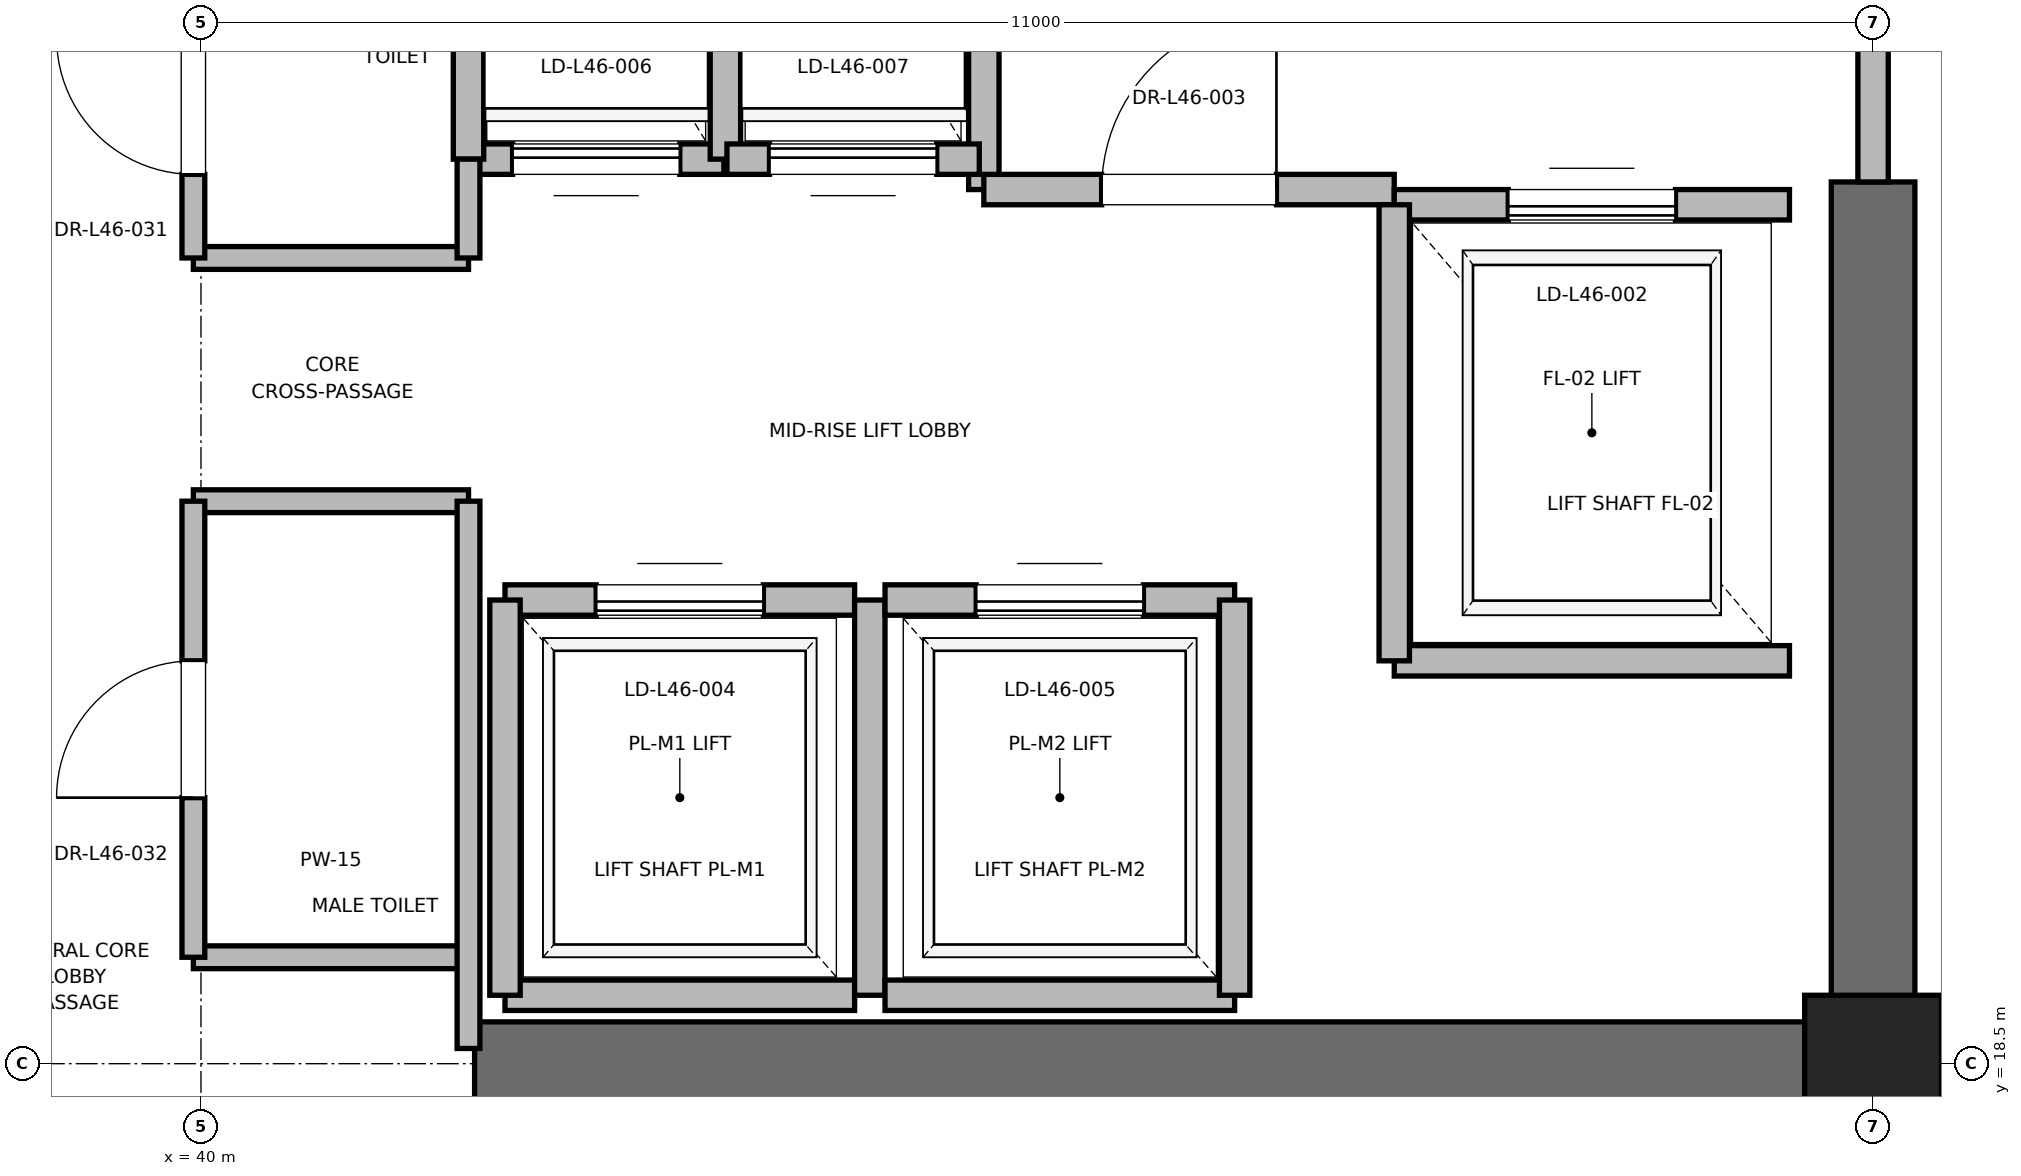
"""IFC4 building model, lengths in metres.
Left out: names, types, materials, properties, quantities, classifications, styles, units other than length and angle.
Written with IfcOpenShell. Run it as: python <this file> out.ifc"""

import sys

from ifc_helpers import new_model, si_unit, direction, frame, frame_2d, origin, origin_2d, place, context, subcontext, project, spatial, rectangle, extrude, element, fill, save


model = new_model("IFC4")
c1 = context("Model", 3, precision=1e-05, world=origin(), true_north=direction((0.0, 1.0)))
c2 = subcontext(c1, "Body", "Model", "MODEL_VIEW")
j1 = project(units=[si_unit("LENGTHUNIT", "METRE"), si_unit("PLANEANGLEUNIT", "RADIAN")], contexts=[c1])
p1 = place(None, origin())
s1 = spatial("IfcSite", under=j1, at=p1, CompositionType="ELEMENT")
p2 = place(p1, origin())
s2 = spatial("IfcBuilding", under=s1, at=p2, CompositionType="ELEMENT")
p3 = place(p2, frame((0.0, 0.0, 200.2)))
s3 = spatial("IfcBuildingStorey", under=s2, at=p3, CompositionType="ELEMENT", Elevation=200.2)
p4 = place(p3, frame((51.0, 18.5, 0.0), z_axis=(0.0, 0.0, 1.0), x_axis=(1.0, 0.0, 0.0)))
e1 = element("IfcColumn", 1, at=p4, inside=s3, PredefinedType="PILASTER", context=c2, shape_type="SweptSolid", body=[
    extrude(rectangle(XDim=0.9, YDim=0.9, at=origin_2d()), origin(), (0.0, 0.0, 1.0), 5.0),
])
p5 = place(p3, frame((41.8, 18.5, 0.0), z_axis=(0.0, 0.0, 1.0), x_axis=(1.0, 0.0, 0.0)))
e2 = element("IfcWall", 2, at=p5, inside=s3, PredefinedType="SHEAR", context=c2, shape_type="SweptSolid", body=[
    extrude(rectangle(XDim=9.2, YDim=0.55, at=frame_2d((4.6, 0.0))), origin(), (0.0, 0.0, 1.0), 4.775),
])
p6 = place(p3, frame((51.0, 18.5, 0.0), z_axis=(0.0, 0.0, 1.0), x_axis=(0.0, 1.0, 0.0)))
e3 = element("IfcWall", 3, at=p6, inside=s3, PredefinedType="SHEAR", context=c2, shape_type="SweptSolid", body=[
    extrude(rectangle(XDim=5.8, YDim=0.55, at=frame_2d((2.9, 0.0))), origin(), (0.0, 0.0, 1.0), 4.775),
])
p7 = place(p3, frame((45.15, 24.25, 0.0), z_axis=(0.0, 0.0, 1.0), x_axis=(0.0, 1.0, 0.0)))
e4 = element("IfcWall", 4, at=p7, inside=s3, PredefinedType="PARTITIONING", context=c2, shape_type="SweptSolid", body=[
    extrude(rectangle(XDim=3.37, YDim=0.2, at=frame_2d((1.685, 0.0))), origin(), (0.0, 0.0, 1.0), 4.775),
])
p8 = place(p3, frame((45.15, 24.25, 0.0), z_axis=(0.0, 0.0, 1.0), x_axis=(1.0, 0.0, 0.0)))
e5 = element("IfcWall", 5, at=p8, inside=s3, PredefinedType="PARTITIONING", context=c2, shape_type="SweptSolid", body=[
    extrude(rectangle(XDim=2.7, YDim=0.2, at=frame_2d((1.35, 0.0))), origin(), (0.0, 0.0, 1.0), 4.775),
])
p9 = place(p8, frame((0.775, 0.0, 0.0)))
e6 = element("IfcOpeningElement", 6, at=p9, cuts=e5, PredefinedType="OPENING", context=c2, shape_type="SweptSolid", body=[
    extrude(rectangle(XDim=1.15, YDim=2.2, at=frame_2d((0.575, 1.1))), frame((0.0, 0.1, 0.0), z_axis=(0.0, -1.0, 0.0), x_axis=(1.0, 0.0, 0.0)), (0.0, 0.0, 1.0), 0.2),
])
p10 = place(p3, frame((51.0, 24.3, 0.0), z_axis=(0.0, 0.0, 1.0), x_axis=(0.0, 1.0, 0.0)))
e7 = element("IfcWall", 7, at=p10, inside=s3, PredefinedType="PARTITIONING", context=c2, shape_type="SweptSolid", body=[
    extrude(rectangle(XDim=3.4, YDim=0.2, at=frame_2d((1.7, 0.0))), origin(), (0.0, 0.0, 1.0), 3.755),
])
p11 = place(p10, frame((1.125, 0.0, 0.0)))
e8 = element("IfcOpeningElement", 8, at=p11, cuts=e7, PredefinedType="OPENING", context=c2, shape_type="SweptSolid", body=[
    extrude(rectangle(XDim=1.15, YDim=2.2, at=frame_2d((0.575, 1.1))), frame((0.0, 0.1, 0.0), z_axis=(0.0, -1.0, 0.0), x_axis=(1.0, 0.0, 0.0)), (0.0, 0.0, 1.0), 0.2),
])
p12 = place(p3, frame((47.85, 21.15, 0.0), z_axis=(0.0, 0.0, 1.0), x_axis=(1.0, 0.0, 0.0)))
e9 = element("IfcWall", 9, at=p12, inside=s3, PredefinedType="SOLIDWALL", context=c2, shape_type="SweptSolid", body=[
    extrude(rectangle(XDim=2.6, YDim=0.2, at=frame_2d((1.3, 0.0))), origin(), (0.0, 0.0, 1.0), 4.775),
])
p13 = place(p3, frame((50.45, 24.15, 0.0), z_axis=(0.0, 0.0, 1.0), x_axis=(-1.0, 0.0, 0.0)))
e10 = element("IfcWall", 10, at=p13, inside=s3, PredefinedType="SOLIDWALL", context=c2, shape_type="SweptSolid", body=[
    extrude(rectangle(XDim=2.6, YDim=0.2, at=frame_2d((1.3, 0.0))), origin(), (0.0, 0.0, 1.0), 3.755),
])
p14 = place(p13, frame((0.75, 0.0, 0.0)))
e11 = element("IfcOpeningElement", 11, at=p14, cuts=e10, PredefinedType="OPENING", context=c2, shape_type="SweptSolid", body=[
    extrude(rectangle(XDim=1.1, YDim=2.2, at=frame_2d((0.55, 1.1))), frame((0.0, 0.1, 0.0), z_axis=(0.0, -1.0, 0.0), x_axis=(1.0, 0.0, 0.0)), (0.0, 0.0, 1.0), 0.2),
])
p15 = place(p3, frame((47.85, 24.15, 0.0), z_axis=(0.0, 0.0, 1.0), x_axis=(0.0, -1.0, 0.0)))
e12 = element("IfcWall", 12, at=p15, inside=s3, PredefinedType="SOLIDWALL", context=c2, shape_type="SweptSolid", body=[
    extrude(rectangle(XDim=3.0, YDim=0.2, at=frame_2d((1.5, 0.0))), origin(), (0.0, 0.0, 1.0), 4.775),
])
p16 = place(p3, frame((42.0, 18.95, 0.0), z_axis=(0.0, 0.0, 1.0), x_axis=(1.0, 0.0, 0.0)))
e13 = element("IfcWall", 13, at=p16, inside=s3, PredefinedType="SOLIDWALL", context=c2, shape_type="SweptSolid", body=[
    extrude(rectangle(XDim=2.3, YDim=0.2, at=frame_2d((1.15, 0.0))), origin(), (0.0, 0.0, 1.0), 3.755),
])
p17 = place(p3, frame((44.3, 21.55, 0.0), z_axis=(0.0, 0.0, 1.0), x_axis=(-1.0, 0.0, 0.0)))
e14 = element("IfcWall", 14, at=p17, inside=s3, PredefinedType="SOLIDWALL", context=c2, shape_type="SweptSolid", body=[
    extrude(rectangle(XDim=2.3, YDim=0.2, at=frame_2d((1.15, 0.0))), origin(), (0.0, 0.0, 1.0), 4.775),
])
p18 = place(p17, frame((0.6, 0.0, 0.0)))
e15 = element("IfcOpeningElement", 15, at=p18, cuts=e14, PredefinedType="OPENING", context=c2, shape_type="SweptSolid", body=[
    extrude(rectangle(XDim=1.1, YDim=2.2, at=frame_2d((0.55, 1.1))), frame((0.0, 0.1, 0.0), z_axis=(0.0, -1.0, 0.0), x_axis=(1.0, 0.0, 0.0)), (0.0, 0.0, 1.0), 0.2),
])
p19 = place(p3, frame((42.0, 21.55, 0.0), z_axis=(0.0, 0.0, 1.0), x_axis=(0.0, -1.0, 0.0)))
e16 = element("IfcWall", 16, at=p19, inside=s3, PredefinedType="SOLIDWALL", context=c2, shape_type="SweptSolid", body=[
    extrude(rectangle(XDim=2.6, YDim=0.2, at=frame_2d((1.3, 0.0))), origin(), (0.0, 0.0, 1.0), 3.755),
])
p20 = place(p3, frame((44.4, 18.95, 0.0), z_axis=(0.0, 0.0, 1.0), x_axis=(0.0, 1.0, 0.0)))
e17 = element("IfcWall", 17, at=p20, inside=s3, PredefinedType="SOLIDWALL", context=c2, shape_type="SweptSolid", body=[
    extrude(rectangle(XDim=2.6, YDim=0.2, at=frame_2d((1.3, 0.0))), origin(), (0.0, 0.0, 1.0), 4.775),
])
p21 = place(p3, frame((44.5, 18.95, 0.0), z_axis=(0.0, 0.0, 1.0), x_axis=(1.0, 0.0, 0.0)))
e18 = element("IfcWall", 18, at=p21, inside=s3, PredefinedType="SOLIDWALL", context=c2, shape_type="SweptSolid", body=[
    extrude(rectangle(XDim=2.3, YDim=0.2, at=frame_2d((1.15, 0.0))), origin(), (0.0, 0.0, 1.0), 4.775),
])
p22 = place(p3, frame((46.8, 21.55, 0.0), z_axis=(0.0, 0.0, 1.0), x_axis=(-1.0, 0.0, 0.0)))
e19 = element("IfcWall", 19, at=p22, inside=s3, PredefinedType="SOLIDWALL", context=c2, shape_type="SweptSolid", body=[
    extrude(rectangle(XDim=2.3, YDim=0.2, at=frame_2d((1.15, 0.0))), origin(), (0.0, 0.0, 1.0), 4.775),
])
p23 = place(p22, frame((0.6, 0.0, 0.0)))
e20 = element("IfcOpeningElement", 20, at=p23, cuts=e19, PredefinedType="OPENING", context=c2, shape_type="SweptSolid", body=[
    extrude(rectangle(XDim=1.1, YDim=2.2, at=frame_2d((0.55, 1.1))), frame((0.0, 0.1, 0.0), z_axis=(0.0, -1.0, 0.0), x_axis=(1.0, 0.0, 0.0)), (0.0, 0.0, 1.0), 0.2),
])
p24 = place(p3, frame((46.8, 18.95, 0.0), z_axis=(0.0, 0.0, 1.0), x_axis=(0.0, 1.0, 0.0)))
e21 = element("IfcWall", 21, at=p24, inside=s3, PredefinedType="SOLIDWALL", context=c2, shape_type="SweptSolid", body=[
    extrude(rectangle(XDim=2.6, YDim=0.2, at=frame_2d((1.3, 0.0))), origin(), (0.0, 0.0, 1.0), 4.775),
])
p25 = place(p3, frame((41.76, 24.45, 0.0), z_axis=(0.0, 0.0, 1.0), x_axis=(1.0, 0.0, 0.0)))
e22 = element("IfcWall", 22, at=p25, inside=s3, PredefinedType="SOLIDWALL", context=c2, shape_type="SweptSolid", body=[
    extrude(rectangle(XDim=1.68, YDim=0.2, at=frame_2d((0.84, 0.0))), origin(), (0.0, 0.0, 1.0), 4.775),
])
p26 = place(p25, frame((0.29, 0.0, 0.0)))
e23 = element("IfcOpeningElement", 23, at=p26, cuts=e22, PredefinedType="OPENING", context=c2, shape_type="SweptSolid", body=[
    extrude(rectangle(XDim=1.1, YDim=2.2, at=frame_2d((0.55, 1.1))), frame((0.0, 0.1, 0.0), z_axis=(0.0, -1.0, 0.0), x_axis=(1.0, 0.0, 0.0)), (0.0, 0.0, 1.0), 0.2),
])
for number, where, z_axis, x_axis in (
    (24, (41.76, 27.05, 0.0), (0.0, 0.0, 1.0), (0.0, -1.0, 0.0)),
    (25, (43.45, 24.45, 0.0), (0.0, 0.0, 1.0), (0.0, 1.0, 0.0)),
):
    element("IfcWall", number, at=place(p3, frame(where, z_axis=z_axis, x_axis=x_axis)), inside=s3, PredefinedType="SOLIDWALL", context=c2, shape_type="SweptSolid", body=[
        extrude(rectangle(XDim=2.6, YDim=0.2, at=frame_2d((1.3, 0.0))), origin(), (0.0, 0.0, 1.0), 4.775),
    ])
p27 = place(p3, frame((43.46, 24.45, 0.0), z_axis=(0.0, 0.0, 1.0), x_axis=(1.0, 0.0, 0.0)))
e26 = element("IfcWall", 26, at=p27, inside=s3, PredefinedType="SOLIDWALL", context=c2, shape_type="SweptSolid", body=[
    extrude(rectangle(XDim=1.66, YDim=0.2, at=frame_2d((0.83, 0.0))), origin(), (0.0, 0.0, 1.0), 4.775),
])
p28 = place(p27, frame((0.28, 0.0, 0.0)))
e27 = element("IfcOpeningElement", 27, at=p28, cuts=e26, PredefinedType="OPENING", context=c2, shape_type="SweptSolid", body=[
    extrude(rectangle(XDim=1.1, YDim=2.2, at=frame_2d((0.55, 1.1))), frame((0.0, 0.1, 0.0), z_axis=(0.0, -1.0, 0.0), x_axis=(1.0, 0.0, 0.0)), (0.0, 0.0, 1.0), 0.2),
])
for number, where, z_axis, x_axis in (
    (28, (39.95, 19.2, 0.0), (0.0, 0.0, 1.0), (1.0, 0.0, 0.0)),
    (29, (39.95, 22.2, 0.0), (0.0, 0.0, 1.0), (1.0, 0.0, 0.0)),
    (30, (39.95, 23.8, 0.0), (0.0, 0.0, 1.0), (1.0, 0.0, 0.0)),
):
    element("IfcWall", number, at=place(p3, frame(where, z_axis=z_axis, x_axis=x_axis)), inside=s3, PredefinedType="PARTITIONING", context=c2, shape_type="SweptSolid", body=[
        extrude(rectangle(XDim=1.81, YDim=0.15, at=frame_2d((0.905, 0.0))), origin(), (0.0, 0.0, 1.0), 2.85),
    ])
p29 = place(p3, frame((41.76, 18.6, 0.0), z_axis=(0.0, 0.0, 1.0), x_axis=(0.0, 1.0, 0.0)))
e31 = element("IfcWall", 31, at=p29, inside=s3, PredefinedType="PARTITIONING", context=c2, shape_type="SweptSolid", body=[
    extrude(rectangle(XDim=3.6, YDim=0.15, at=frame_2d((1.8, 0.0))), origin(), (0.0, 0.0, 1.0), 2.85),
])
p30 = place(p3, frame((41.76, 23.8, 0.0), z_axis=(0.0, 0.0, 1.0), x_axis=(0.0, 1.0, 0.0)))
e32 = element("IfcWall", 32, at=p30, inside=s3, PredefinedType="PARTITIONING", context=c2, shape_type="SweptSolid", body=[
    extrude(rectangle(XDim=0.65, YDim=0.15, at=frame_2d((0.325, 0.0))), origin(), (0.0, 0.0, 1.0), 2.85),
])
p31 = place(p3, frame((39.95, 19.2, 0.0), z_axis=(0.0, 0.0, 1.0), x_axis=(0.0, 1.0, 0.0)))
e33 = element("IfcWall", 33, at=p31, inside=s3, PredefinedType="PARTITIONING", context=c2, shape_type="SweptSolid", body=[
    extrude(rectangle(XDim=3.0, YDim=0.15, at=frame_2d((1.5, 0.0))), origin(), (0.0, 0.0, 1.0), 2.85),
])
p32 = place(p31, frame((1.05, 0.0, 0.0)))
e34 = element("IfcOpeningElement", 34, at=p32, cuts=e33, PredefinedType="OPENING", context=c2, shape_type="SweptSolid", body=[
    extrude(rectangle(XDim=0.9, YDim=2.1, at=frame_2d((0.45, 1.05))), frame((0.0, 0.075, 0.0), z_axis=(0.0, -1.0, 0.0), x_axis=(1.0, 0.0, 0.0)), (0.0, 0.0, 1.0), 0.15),
])
p33 = place(p3, frame((39.95, 23.8, 0.0), z_axis=(0.0, 0.0, 1.0), x_axis=(0.0, 1.0, 0.0)))
e35 = element("IfcWall", 35, at=p33, inside=s3, PredefinedType="PARTITIONING", context=c2, shape_type="SweptSolid", body=[
    extrude(rectangle(XDim=2.0, YDim=0.15, at=frame_2d((1.0, 0.0))), origin(), (0.0, 0.0, 1.0), 2.85),
])
p34 = place(p33, frame((0.55, 0.0, 0.0)))
e36 = element("IfcOpeningElement", 36, at=p34, cuts=e35, PredefinedType="OPENING", context=c2, shape_type="SweptSolid", body=[
    extrude(rectangle(XDim=0.9, YDim=2.1, at=frame_2d((0.45, 1.05))), frame((0.0, 0.075, 0.0), z_axis=(0.0, -1.0, 0.0), x_axis=(1.0, 0.0, 0.0)), (0.0, 0.0, 1.0), 0.15),
])
p35 = place(p9, origin())
e37 = element("IfcDoor", 37, at=p35, inside=s3, OperationType="SINGLE_SWING_RIGHT", PredefinedType="DOOR", context=c2, shape_type="SweptSolid", body=[
    extrude(rectangle(XDim=1.15, YDim=2.2, at=frame_2d((0.575, 1.1))), frame((0.0, 0.025, 0.0), z_axis=(0.0, -1.0, 0.0), x_axis=(1.0, 0.0, 0.0)), (0.0, 0.0, 1.0), 0.05),
])
fill(e6, e37)
p36 = place(p14, origin())
e38 = element("IfcDoor", 38, at=p36, inside=s3, OperationType="SLIDING_TO_RIGHT", PredefinedType="DOOR", context=c2, shape_type="SweptSolid", body=[
    extrude(rectangle(XDim=1.1, YDim=2.2, at=frame_2d((0.55, 1.1))), frame((0.0, 0.025, 0.0), z_axis=(0.0, -1.0, 0.0), x_axis=(1.0, 0.0, 0.0)), (0.0, 0.0, 1.0), 0.05),
])
fill(e11, e38)
p37 = place(p18, origin())
e39 = element("IfcDoor", 39, at=p37, inside=s3, OperationType="SLIDING_TO_RIGHT", PredefinedType="DOOR", context=c2, shape_type="SweptSolid", body=[
    extrude(rectangle(XDim=1.1, YDim=2.2, at=frame_2d((0.55, 1.1))), frame((0.0, 0.025, 0.0), z_axis=(0.0, -1.0, 0.0), x_axis=(1.0, 0.0, 0.0)), (0.0, 0.0, 1.0), 0.05),
])
fill(e15, e39)
p38 = place(p23, origin())
e40 = element("IfcDoor", 40, at=p38, inside=s3, OperationType="SLIDING_TO_RIGHT", PredefinedType="DOOR", context=c2, shape_type="SweptSolid", body=[
    extrude(rectangle(XDim=1.1, YDim=2.2, at=frame_2d((0.55, 1.1))), frame((0.0, 0.025, 0.0), z_axis=(0.0, -1.0, 0.0), x_axis=(1.0, 0.0, 0.0)), (0.0, 0.0, 1.0), 0.05),
])
fill(e20, e40)
p39 = place(p26, origin())
e41 = element("IfcDoor", 41, at=p39, inside=s3, OperationType="SLIDING_TO_RIGHT", PredefinedType="DOOR", context=c2, shape_type="SweptSolid", body=[
    extrude(rectangle(XDim=1.1, YDim=2.2, at=frame_2d((0.55, 1.1))), frame((0.0, 0.025, 0.0), z_axis=(0.0, -1.0, 0.0), x_axis=(1.0, 0.0, 0.0)), (0.0, 0.0, 1.0), 0.05),
])
fill(e23, e41)
p40 = place(p28, origin())
e42 = element("IfcDoor", 42, at=p40, inside=s3, OperationType="SLIDING_TO_RIGHT", PredefinedType="DOOR", context=c2, shape_type="SweptSolid", body=[
    extrude(rectangle(XDim=1.1, YDim=2.2, at=frame_2d((0.55, 1.1))), frame((0.0, 0.025, 0.0), z_axis=(0.0, -1.0, 0.0), x_axis=(1.0, 0.0, 0.0)), (0.0, 0.0, 1.0), 0.05),
])
fill(e27, e42)
p41 = place(p32, origin())
e43 = element("IfcDoor", 43, at=p41, inside=s3, OperationType="SINGLE_SWING_LEFT", PredefinedType="DOOR", context=c2, shape_type="SweptSolid", body=[
    extrude(rectangle(XDim=0.9, YDim=2.1, at=frame_2d((0.45, 1.05))), frame((0.0, 0.025, 0.0), z_axis=(0.0, -1.0, 0.0), x_axis=(1.0, 0.0, 0.0)), (0.0, 0.0, 1.0), 0.05),
])
fill(e34, e43)
p42 = place(p34, origin())
e44 = element("IfcDoor", 44, at=p42, inside=s3, OperationType="SINGLE_SWING_RIGHT", PredefinedType="DOOR", context=c2, shape_type="SweptSolid", body=[
    extrude(rectangle(XDim=0.9, YDim=2.1, at=frame_2d((0.45, 1.05))), frame((0.0, 0.025, 0.0), z_axis=(0.0, -1.0, 0.0), x_axis=(1.0, 0.0, 0.0)), (0.0, 0.0, 1.0), 0.05),
])
fill(e36, e44)
save(model, sys.argv[1])
